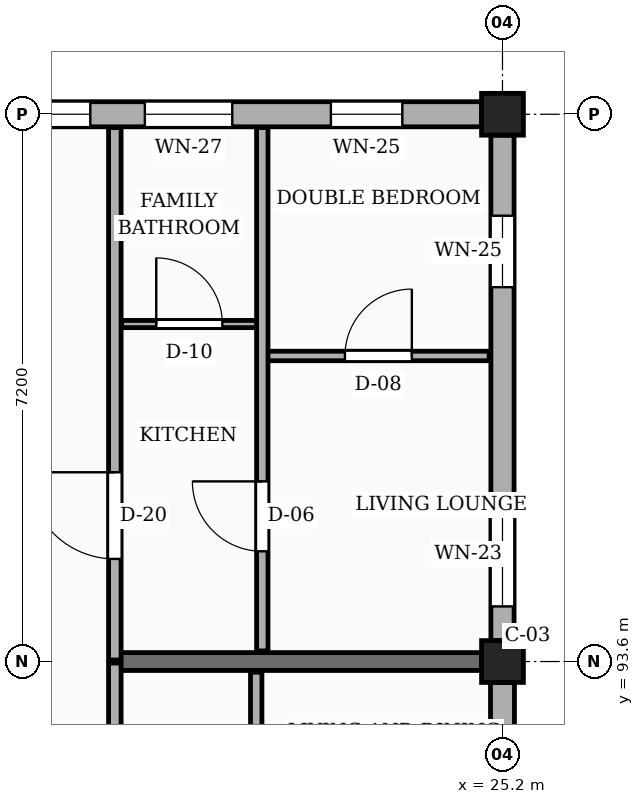
"""IFC4 building model, lengths in metres.
Left out: names, types, materials, properties, quantities, classifications, styles, units other than length and angle.
Written with IfcOpenShell. Run it as: python <this file> out.ifc"""

import sys

from ifc_helpers import new_model, si_unit, direction, frame, frame_2d, origin, origin_2d, place, context, subcontext, project, spatial, rectangle, extrude, element, fill, save


model = new_model("IFC4")
c1 = context("Model", 3, precision=1e-05, world=origin(), true_north=direction((0.0, 1.0)))
c2 = subcontext(c1, "Body", "Model", "MODEL_VIEW")
j1 = project(units=[si_unit("LENGTHUNIT", "METRE"), si_unit("PLANEANGLEUNIT", "RADIAN")], contexts=[c1])
p1 = place(None, origin())
s1 = spatial("IfcSite", under=j1, at=p1, CompositionType="ELEMENT")
p2 = place(p1, origin())
s2 = spatial("IfcBuilding", under=s1, at=p2, CompositionType="ELEMENT")
p3 = place(p2, frame((0.0, 0.0, 17.1)))
s3 = spatial("IfcBuildingStorey", under=s2, at=p3, CompositionType="ELEMENT", Elevation=17.1)
for number, where, z_axis, x_axis in (
    (1, (25.2, 93.6, 0.0), (0.0, 0.0, 1.0), (1.0, 0.0, 0.0)),
    (2, (25.2, 100.8, 0.0), (0.0, 0.0, 1.0), (1.0, 0.0, 0.0)),
):
    element("IfcColumn", number, at=place(p3, frame(where, z_axis=z_axis, x_axis=x_axis)), inside=s3, PredefinedType="COLUMN", context=c2, shape_type="SweptSolid", body=[
        extrude(rectangle(XDim=0.55, YDim=0.55, at=origin_2d()), origin(), (0.0, 0.0, 1.0), 3.15),
    ])
p4 = place(p3, frame((20.1, 93.6, 0.0), z_axis=(0.0, 0.0, 1.0), x_axis=(1.0, 0.0, 0.0)))
e3 = element("IfcWall", 3, at=p4, inside=s3, PredefinedType="SOLIDWALL", context=c2, shape_type="SweptSolid", body=[
    extrude(rectangle(XDim=4.825, YDim=0.235, at=frame_2d((2.413, 0.0))), origin(), (0.0, 0.0, 1.0), 2.21),
])
p5 = place(p3, frame((25.2, 86.675, 0.0), z_axis=(0.0, 0.0, 1.0), x_axis=(0.0, 1.0, 0.0)))
e4 = element("IfcWall", 4, at=p5, inside=s3, PredefinedType="SOLIDWALL", context=c2, shape_type="SweptSolid", body=[
    extrude(rectangle(XDim=6.65, YDim=0.315, at=frame_2d((3.325, 0.0))), origin(), (0.0, 0.0, 1.0), 2.48),
])
p6 = place(p5, frame((0.45, 0.0, 0.78)))
e5 = element("IfcOpeningElement", 5, at=p6, cuts=e4, PredefinedType="OPENING", context=c2, shape_type="SweptSolid", body=[
    extrude(rectangle(XDim=1.22, YDim=1.36, at=frame_2d((0.61, 0.68))), frame((0.0, 0.167, 0.0), z_axis=(0.0, -1.0, 0.0), x_axis=(1.0, 0.0, 0.0)), (0.0, 0.0, 1.0), 0.335),
])
p7 = place(p5, frame((4.65, 0.0, 0.78)))
e6 = element("IfcOpeningElement", 6, at=p7, cuts=e4, PredefinedType="OPENING", context=c2, shape_type="SweptSolid", body=[
    extrude(rectangle(XDim=1.38, YDim=1.36, at=frame_2d((0.69, 0.68))), frame((0.0, 0.167, 0.0), z_axis=(0.0, -1.0, 0.0), x_axis=(1.0, 0.0, 0.0)), (0.0, 0.0, 1.0), 0.335),
])
p8 = place(p3, frame((25.2, 93.875, 0.0), z_axis=(0.0, 0.0, 1.0), x_axis=(0.0, 1.0, 0.0)))
e7 = element("IfcWall", 7, at=p8, inside=s3, PredefinedType="SOLIDWALL", context=c2, shape_type="SweptSolid", body=[
    extrude(rectangle(XDim=6.65, YDim=0.305, at=frame_2d((3.325, 0.0))), origin(), (0.0, 0.0, 1.0), 2.48),
])
p9 = place(p8, frame((0.45, 0.0, 0.78)))
e8 = element("IfcOpeningElement", 8, at=p9, cuts=e7, PredefinedType="OPENING", context=c2, shape_type="SweptSolid", body=[
    extrude(rectangle(XDim=1.38, YDim=1.36, at=frame_2d((0.69, 0.68))), frame((0.0, 0.163, 0.0), z_axis=(0.0, -1.0, 0.0), x_axis=(1.0, 0.0, 0.0)), (0.0, 0.0, 1.0), 0.325),
])
p10 = place(p8, frame((4.65, 0.0, 0.78)))
e9 = element("IfcOpeningElement", 9, at=p10, cuts=e7, PredefinedType="OPENING", context=c2, shape_type="SweptSolid", body=[
    extrude(rectangle(XDim=0.94, YDim=1.44, at=frame_2d((0.47, 0.72))), frame((0.0, 0.163, 0.0), z_axis=(0.0, -1.0, 0.0), x_axis=(1.0, 0.0, 0.0)), (0.0, 0.0, 1.0), 0.325),
])
p11 = place(p3, frame((24.925, 100.8, 0.0), z_axis=(0.0, 0.0, 1.0), x_axis=(-1.0, 0.0, 0.0)))
e10 = element("IfcWall", 10, at=p11, inside=s3, PredefinedType="SOLIDWALL", context=c2, shape_type="SweptSolid", body=[
    extrude(rectangle(XDim=6.65, YDim=0.33, at=frame_2d((3.325, 0.0))), origin(), (0.0, 0.0, 1.0), 2.48),
])
p12 = place(p11, frame((1.042, 0.0, 0.78)))
e11 = element("IfcOpeningElement", 11, at=p12, cuts=e10, PredefinedType="OPENING", context=c2, shape_type="SweptSolid", body=[
    extrude(rectangle(XDim=0.94, YDim=1.44, at=frame_2d((0.47, 0.72))), frame((0.0, 0.175, 0.0), z_axis=(0.0, -1.0, 0.0), x_axis=(1.0, 0.0, 0.0)), (0.0, 0.0, 1.0), 0.35),
])
p13 = place(p11, frame((3.28, 0.0, 0.78)))
e12 = element("IfcOpeningElement", 12, at=p13, cuts=e10, PredefinedType="OPENING", context=c2, shape_type="SweptSolid", body=[
    extrude(rectangle(XDim=1.15, YDim=1.44, at=frame_2d((0.575, 0.72))), frame((0.0, 0.175, 0.0), z_axis=(0.0, -1.0, 0.0), x_axis=(1.0, 0.0, 0.0)), (0.0, 0.0, 1.0), 0.35),
])
p14 = place(p11, frame((5.147, 0.0, 0.78)))
e13 = element("IfcOpeningElement", 13, at=p14, cuts=e10, PredefinedType="OPENING", context=c2, shape_type="SweptSolid", body=[
    extrude(rectangle(XDim=1.04, YDim=1.26, at=frame_2d((0.52, 0.63))), frame((0.0, 0.175, 0.0), z_axis=(0.0, -1.0, 0.0), x_axis=(1.0, 0.0, 0.0)), (0.0, 0.0, 1.0), 0.35),
])
p15 = place(p3, frame((20.1, 86.42, 0.0), z_axis=(0.0, 0.0, 1.0), x_axis=(0.0, 1.0, 0.0)))
e14 = element("IfcWall", 14, at=p15, inside=s3, PredefinedType="PARTITIONING", context=c2, shape_type="SweptSolid", body=[
    extrude(rectangle(XDim=7.16, YDim=0.165, at=frame_2d((3.58, 0.0))), origin(), (0.0, 0.0, 1.0), 2.345),
])
p16 = place(p15, frame((4.78, 0.0, 0.0)))
e15 = element("IfcOpeningElement", 15, at=p16, cuts=e14, PredefinedType="OPENING", context=c2, shape_type="SweptSolid", body=[
    extrude(rectangle(XDim=0.94, YDim=2.12, at=frame_2d((0.47, 1.06))), frame((0.0, 0.093, 0.0), z_axis=(0.0, -1.0, 0.0), x_axis=(1.0, 0.0, 0.0)), (0.0, 0.0, 1.0), 0.185),
])
p17 = place(p3, frame((20.1, 93.62, 0.0), z_axis=(0.0, 0.0, 1.0), x_axis=(0.0, 1.0, 0.0)))
e16 = element("IfcWall", 16, at=p17, inside=s3, PredefinedType="PARTITIONING", context=c2, shape_type="SweptSolid", body=[
    extrude(rectangle(XDim=7.005, YDim=0.165, at=frame_2d((3.502, 0.0))), origin(), (0.0, 0.0, 1.0), 2.345),
])
p18 = place(p17, frame((1.33, 0.0, 0.0)))
e17 = element("IfcOpeningElement", 17, at=p18, cuts=e16, PredefinedType="OPENING", context=c2, shape_type="SweptSolid", body=[
    extrude(rectangle(XDim=1.14, YDim=2.18, at=frame_2d((0.57, 1.09))), frame((0.0, 0.093, 0.0), z_axis=(0.0, -1.0, 0.0), x_axis=(1.0, 0.0, 0.0)), (0.0, 0.0, 1.0), 0.185),
])
p19 = place(p3, frame((21.96, 86.54, 0.0), z_axis=(0.0, 0.0, 1.0), x_axis=(0.0, 1.0, 0.0)))
e18 = element("IfcWall", 18, at=p19, inside=s3, PredefinedType="PARTITIONING", context=c2, shape_type="SweptSolid", body=[
    extrude(rectangle(XDim=6.92, YDim=0.15, at=frame_2d((3.46, 0.0))), origin(), (0.0, 0.0, 1.0), 2.345),
])
p20 = place(p19, frame((4.66, 0.0, 0.0)))
e19 = element("IfcOpeningElement", 19, at=p20, cuts=e18, PredefinedType="OPENING", context=c2, shape_type="SweptSolid", body=[
    extrude(rectangle(XDim=0.95, YDim=2.1, at=frame_2d((0.475, 1.05))), frame((0.0, 0.085, 0.0), z_axis=(0.0, -1.0, 0.0), x_axis=(1.0, 0.0, 0.0)), (0.0, 0.0, 1.0), 0.17),
])
p21 = place(p3, frame((22.11, 97.62, 0.0), z_axis=(0.0, 0.0, 1.0), x_axis=(1.0, 0.0, 0.0)))
e20 = element("IfcWall", 20, at=p21, inside=s3, PredefinedType="PARTITIONING", context=c2, shape_type="SweptSolid", body=[
    extrude(rectangle(XDim=2.915, YDim=0.125, at=frame_2d((1.458, 0.0))), origin(), (0.0, 0.0, 1.0), 2.345),
])
p22 = place(p21, frame((1.018, 0.0, 0.0)))
e21 = element("IfcOpeningElement", 21, at=p22, cuts=e20, PredefinedType="OPENING", context=c2, shape_type="SweptSolid", body=[
    extrude(rectangle(XDim=0.88, YDim=2.08, at=frame_2d((0.44, 1.04))), frame((0.0, 0.073, 0.0), z_axis=(0.0, -1.0, 0.0), x_axis=(1.0, 0.0, 0.0)), (0.0, 0.0, 1.0), 0.145),
])
p23 = place(p3, frame((20.19, 98.04, 0.0), z_axis=(0.0, 0.0, 1.0), x_axis=(1.0, 0.0, 0.0)))
e22 = element("IfcWall", 22, at=p23, inside=s3, PredefinedType="PARTITIONING", context=c2, shape_type="SweptSolid", body=[
    extrude(rectangle(XDim=1.78, YDim=0.095, at=frame_2d((0.89, 0.0))), origin(), (0.0, 0.0, 1.0), 2.345),
])
p24 = place(p23, frame((0.455, 0.0, 0.0)))
e23 = element("IfcOpeningElement", 23, at=p24, cuts=e22, PredefinedType="OPENING", context=c2, shape_type="SweptSolid", body=[
    extrude(rectangle(XDim=0.87, YDim=2.05, at=frame_2d((0.435, 1.025))), frame((0.0, 0.058, 0.0), z_axis=(0.0, -1.0, 0.0), x_axis=(1.0, 0.0, 0.0)), (0.0, 0.0, 1.0), 0.115),
])
p25 = place(p3, frame((22.04, 93.74, 0.0), z_axis=(0.0, 0.0, 1.0), x_axis=(0.0, 1.0, 0.0)))
e24 = element("IfcWall", 24, at=p25, inside=s3, PredefinedType="PARTITIONING", context=c2, shape_type="SweptSolid", body=[
    extrude(rectangle(XDim=6.885, YDim=0.15, at=frame_2d((3.442, 0.0))), origin(), (0.0, 0.0, 1.0), 2.345),
])
p26 = place(p25, frame((1.31, 0.0, 0.0)))
e25 = element("IfcOpeningElement", 25, at=p26, cuts=e24, PredefinedType="OPENING", context=c2, shape_type="SweptSolid", body=[
    extrude(rectangle(XDim=0.92, YDim=2.1, at=frame_2d((0.46, 1.05))), frame((0.0, 0.085, 0.0), z_axis=(0.0, -1.0, 0.0), x_axis=(1.0, 0.0, 0.0)), (0.0, 0.0, 1.0), 0.17),
])
p27 = place(p9, origin())
e26 = element("IfcWindow", 26, at=p27, inside=s3, PartitioningType="SINGLE_PANEL", PredefinedType="WINDOW", context=c2, shape_type="SweptSolid", body=[
    extrude(rectangle(XDim=1.38, YDim=1.36, at=frame_2d((0.69, 0.68))), frame((0.0, 0.03, 0.0), z_axis=(0.0, -1.0, 0.0), x_axis=(1.0, 0.0, 0.0)), (0.0, 0.0, 1.0), 0.06),
])
fill(e8, e26)
p28 = place(p10, origin())
e27 = element("IfcWindow", 27, at=p28, inside=s3, PartitioningType="SINGLE_PANEL", PredefinedType="WINDOW", context=c2, shape_type="SweptSolid", body=[
    extrude(rectangle(XDim=0.94, YDim=1.44, at=frame_2d((0.47, 0.72))), frame((0.0, 0.03, 0.0), z_axis=(0.0, -1.0, 0.0), x_axis=(1.0, 0.0, 0.0)), (0.0, 0.0, 1.0), 0.06),
])
fill(e9, e27)
p29 = place(p12, origin())
e28 = element("IfcWindow", 28, at=p29, inside=s3, PartitioningType="SINGLE_PANEL", PredefinedType="WINDOW", context=c2, shape_type="SweptSolid", body=[
    extrude(rectangle(XDim=0.94, YDim=1.44, at=frame_2d((0.47, 0.72))), frame((0.0, 0.03, 0.0), z_axis=(0.0, -1.0, 0.0), x_axis=(1.0, 0.0, 0.0)), (0.0, 0.0, 1.0), 0.06),
])
fill(e11, e28)
p30 = place(p13, origin())
e29 = element("IfcWindow", 29, at=p30, inside=s3, PartitioningType="SINGLE_PANEL", PredefinedType="WINDOW", context=c2, shape_type="SweptSolid", body=[
    extrude(rectangle(XDim=1.15, YDim=1.44, at=frame_2d((0.575, 0.72))), frame((0.0, 0.03, 0.0), z_axis=(0.0, -1.0, 0.0), x_axis=(1.0, 0.0, 0.0)), (0.0, 0.0, 1.0), 0.06),
])
fill(e12, e29)
p31 = place(p14, origin())
e30 = element("IfcWindow", 30, at=p31, inside=s3, PartitioningType="SINGLE_PANEL", PredefinedType="WINDOW", context=c2, shape_type="SweptSolid", body=[
    extrude(rectangle(XDim=1.04, YDim=1.26, at=frame_2d((0.52, 0.63))), frame((0.0, 0.03, 0.0), z_axis=(0.0, -1.0, 0.0), x_axis=(1.0, 0.0, 0.0)), (0.0, 0.0, 1.0), 0.06),
])
fill(e13, e30)
p32 = place(p18, origin())
e31 = element("IfcDoor", 31, at=p32, inside=s3, OperationType="SINGLE_SWING_RIGHT", PredefinedType="DOOR", context=c2, shape_type="SweptSolid", body=[
    extrude(rectangle(XDim=1.14, YDim=2.18, at=frame_2d((0.57, 1.09))), frame((0.0, 0.025, 0.0), z_axis=(0.0, -1.0, 0.0), x_axis=(1.0, 0.0, 0.0)), (0.0, 0.0, 1.0), 0.05),
])
fill(e17, e31)
p33 = place(p22, origin())
e32 = element("IfcDoor", 32, at=p33, inside=s3, OperationType="SINGLE_SWING_RIGHT", PredefinedType="DOOR", context=c2, shape_type="SweptSolid", body=[
    extrude(rectangle(XDim=0.88, YDim=2.08, at=frame_2d((0.44, 1.04))), frame((0.0, 0.025, 0.0), z_axis=(0.0, -1.0, 0.0), x_axis=(1.0, 0.0, 0.0)), (0.0, 0.0, 1.0), 0.05),
])
fill(e21, e32)
p34 = place(p24, origin())
e33 = element("IfcDoor", 33, at=p34, inside=s3, OperationType="SINGLE_SWING_LEFT", PredefinedType="DOOR", context=c2, shape_type="SweptSolid", body=[
    extrude(rectangle(XDim=0.87, YDim=2.05, at=frame_2d((0.435, 1.025))), frame((0.0, 0.025, 0.0), z_axis=(0.0, -1.0, 0.0), x_axis=(1.0, 0.0, 0.0)), (0.0, 0.0, 1.0), 0.05),
])
fill(e23, e33)
p35 = place(p26, origin())
e34 = element("IfcDoor", 34, at=p35, inside=s3, OperationType="SINGLE_SWING_RIGHT", PredefinedType="DOOR", context=c2, shape_type="SweptSolid", body=[
    extrude(rectangle(XDim=0.92, YDim=2.1, at=frame_2d((0.46, 1.05))), frame((0.0, 0.025, 0.0), z_axis=(0.0, -1.0, 0.0), x_axis=(1.0, 0.0, 0.0)), (0.0, 0.0, 1.0), 0.05),
])
fill(e25, e34)
save(model, sys.argv[1])
